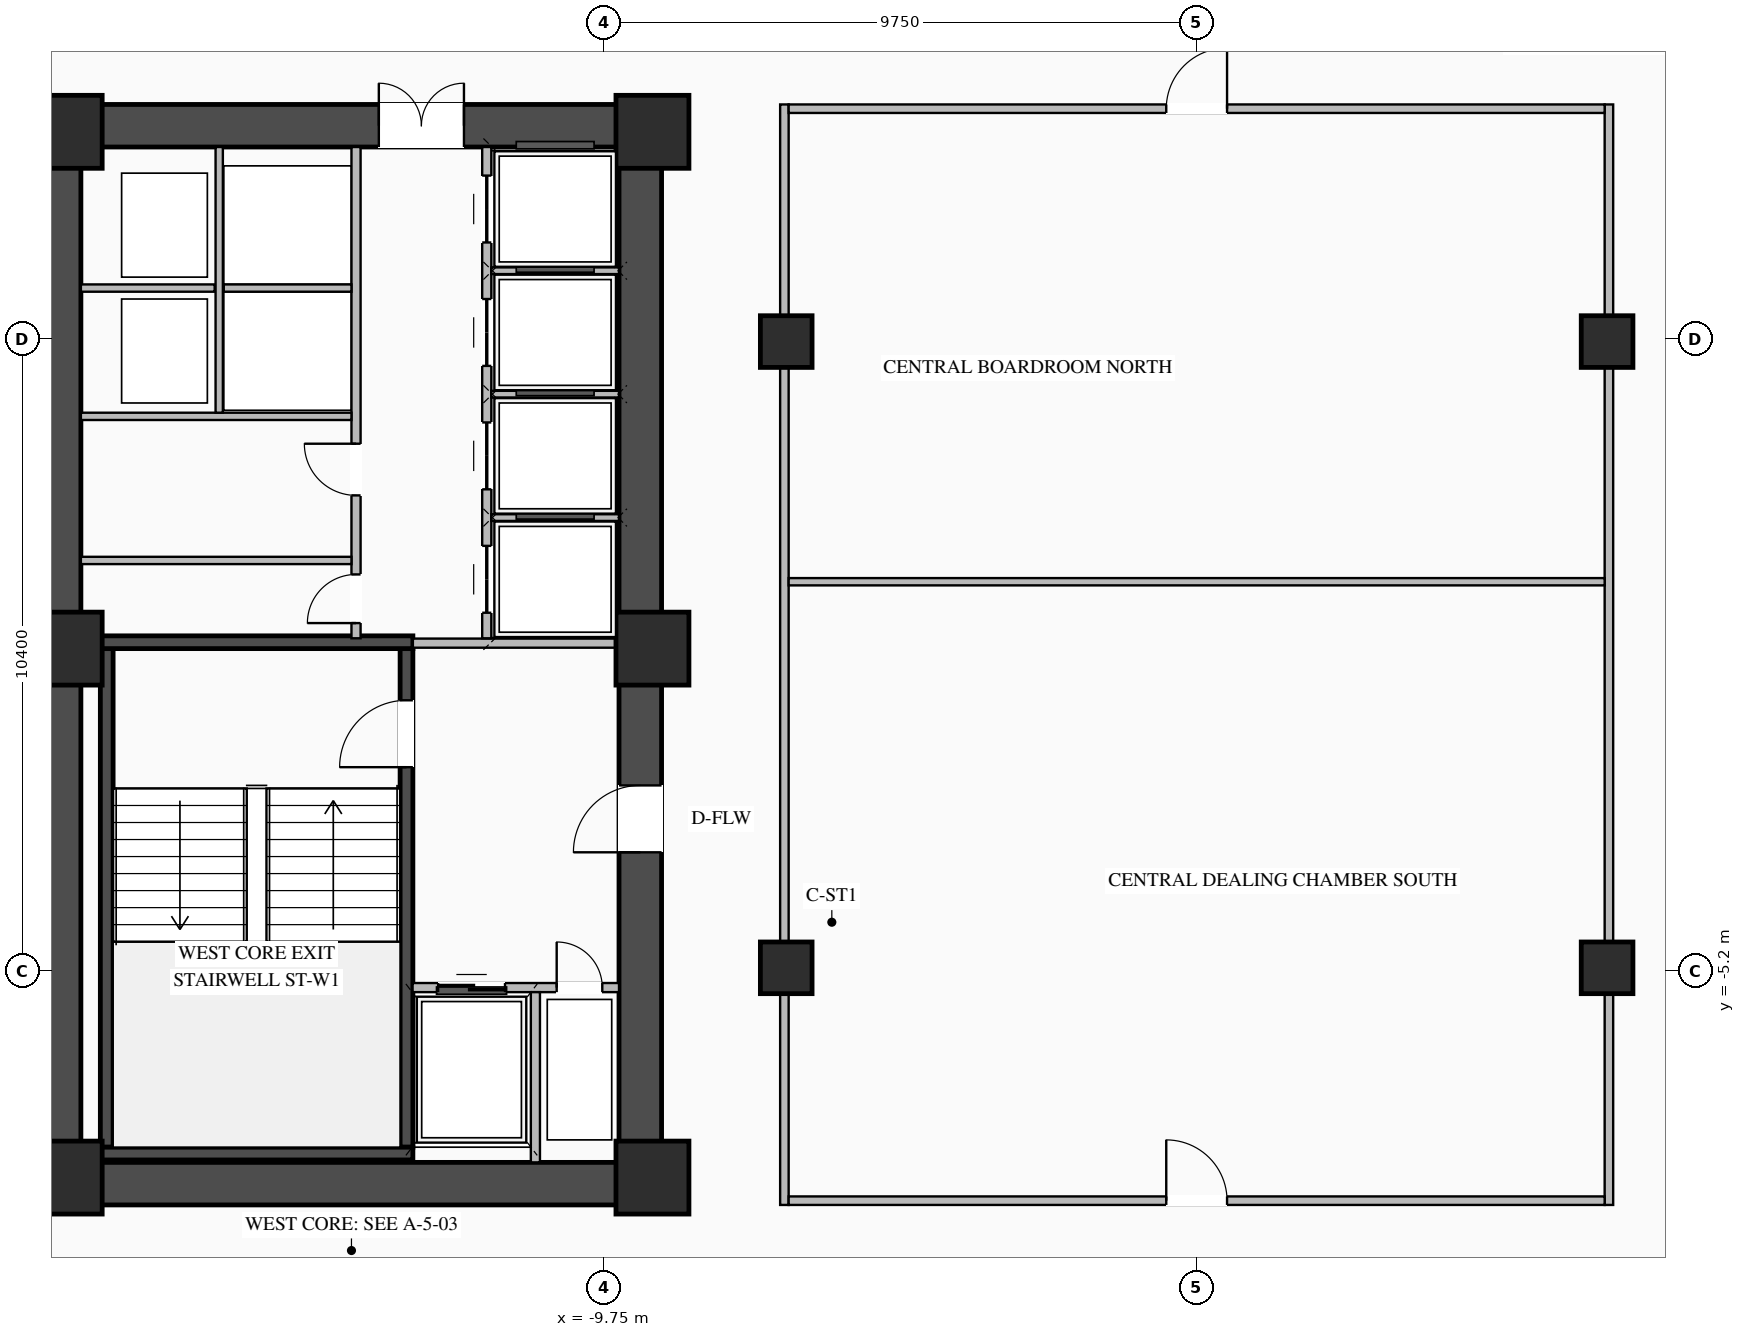
"""IFC4 building model, lengths in metres.
Left out: names, types, materials, properties, quantities, classifications, styles, units other than length and angle.
Written with IfcOpenShell. Run it as: python <this file> out.ifc"""

import sys

from ifc_helpers import new_model, si_unit, direction, frame, frame_2d, origin, origin_2d, place, context, subcontext, project, spatial, rectangle, i_section, extrude, element, fill, save


model = new_model("IFC4")
c1 = context("Model", 3, precision=1e-05, world=origin(), true_north=direction((0.0, 1.0)))
c2 = subcontext(c1, "Body", "Model", "MODEL_VIEW")
j1 = project(units=[si_unit("LENGTHUNIT", "METRE"), si_unit("PLANEANGLEUNIT", "RADIAN")], contexts=[c1])
p1 = place(None, origin())
s1 = spatial("IfcSite", under=j1, at=p1, CompositionType="ELEMENT")
p2 = place(p1, origin())
s2 = spatial("IfcBuilding", under=s1, at=p2, CompositionType="ELEMENT")
p3 = place(p2, frame((0.0, 0.0, 31.2)))
s3 = spatial("IfcBuildingStorey", under=s2, at=p3, CompositionType="ELEMENT", Elevation=31.2)
p4 = place(p3, frame((-19.05, -8.7, 0.0), z_axis=(0.0, 0.0, 1.0), x_axis=(1.0, 0.0, 0.0)))
e1 = element("IfcWall", 1, at=p4, inside=s3, PredefinedType="SHEAR", context=c2, shape_type="SweptSolid", body=[
    extrude(rectangle(XDim=10.25, YDim=0.7, at=frame_2d((5.125, 0.0))), origin(), (0.0, 0.0, 1.0), 3.27),
])
p5 = place(p3, frame((-19.05, 8.7, 0.0), z_axis=(0.0, 0.0, 1.0), x_axis=(1.0, 0.0, 0.0)))
e2 = element("IfcWall", 2, at=p5, inside=s3, PredefinedType="SHEAR", context=c2, shape_type="SweptSolid", body=[
    extrude(rectangle(XDim=10.25, YDim=0.7, at=frame_2d((5.125, 0.0))), origin(), (0.0, 0.0, 1.0), 3.27),
])
p6 = place(p5, frame((5.6, 0.0, 0.0)))
e3 = element("IfcOpeningElement", 3, at=p6, cuts=e2, PredefinedType="OPENING", context=c2, shape_type="SweptSolid", body=[
    extrude(rectangle(XDim=1.4, YDim=2.05, at=frame_2d((0.7, 1.025))), frame((0.0, 0.36, 0.0), z_axis=(0.0, -1.0, 0.0), x_axis=(1.0, 0.0, 0.0)), (0.0, 0.0, 1.0), 0.72),
])
p7 = place(p3, frame((-18.7, -8.35, 0.0), z_axis=(0.0, 0.0, 1.0), x_axis=(0.0, 1.0, 0.0)))
e4 = element("IfcWall", 4, at=p7, inside=s3, PredefinedType="SHEAR", context=c2, shape_type="SweptSolid", body=[
    extrude(rectangle(XDim=16.7, YDim=0.7, at=frame_2d((8.35, 0.0))), origin(), (0.0, 0.0, 1.0), 3.27),
])
p8 = place(p3, frame((-9.15, -8.35, 0.0), z_axis=(0.0, 0.0, 1.0), x_axis=(0.0, 1.0, 0.0)))
e5 = element("IfcWall", 5, at=p8, inside=s3, PredefinedType="SHEAR", context=c2, shape_type="SweptSolid", body=[
    extrude(rectangle(XDim=16.7, YDim=0.7, at=frame_2d((8.35, 0.0))), origin(), (0.0, 0.0, 1.0), 3.27),
])
p9 = place(p8, frame((5.1, 0.0, 0.0)))
e6 = element("IfcOpeningElement", 6, at=p9, cuts=e5, PredefinedType="OPENING", context=c2, shape_type="SweptSolid", body=[
    extrude(rectangle(XDim=1.1, YDim=2.08, at=frame_2d((0.55, 1.04))), frame((0.0, 0.36, 0.0), z_axis=(0.0, -1.0, 0.0), x_axis=(1.0, 0.0, 0.0)), (0.0, 0.0, 1.0), 0.72),
])
p10 = place(p3, frame((-12.995, -8.1, 0.0), z_axis=(0.0, 0.0, 1.0), x_axis=(0.0, 1.0, 0.0)))
e7 = element("IfcWall", 7, at=p10, inside=s3, PredefinedType="SHEAR", context=c2, shape_type="SweptSolid", body=[
    extrude(rectangle(XDim=8.2, YDim=0.21, at=frame_2d((4.1, 0.0))), origin(), (0.0, 0.0, 1.0), 3.27),
])
p11 = place(p10, frame((6.25, 0.0, 0.0)))
e8 = element("IfcOpeningElement", 8, at=p11, cuts=e7, PredefinedType="OPENING", context=c2, shape_type="SweptSolid", body=[
    extrude(rectangle(XDim=1.1, YDim=2.15, at=frame_2d((0.55, 1.075))), frame((0.0, 0.115, 0.0), z_axis=(0.0, -1.0, 0.0), x_axis=(1.0, 0.0, 0.0)), (0.0, 0.0, 1.0), 0.23),
])
p12 = place(p3, frame((-17.925, -8.1, 0.0), z_axis=(0.0, 0.0, 1.0), x_axis=(0.0, 1.0, 0.0)))
e9 = element("IfcWall", 9, at=p12, inside=s3, PredefinedType="SHEAR", context=c2, shape_type="SweptSolid", body=[
    extrude(rectangle(XDim=8.2, YDim=0.21, at=frame_2d((4.1, 0.0))), origin(), (0.0, 0.0, 1.0), 3.27),
])
for number, where, z_axis, x_axis in (
    (10, (-18.03, -8.205, 0.0), (0.0, 0.0, 1.0), (1.0, 0.0, 0.0)),
    (11, (-12.89, 0.205, 0.0), (0.0, 0.0, 1.0), (-1.0, 0.0, 0.0)),
):
    element("IfcWall", number, at=place(p3, frame(where, z_axis=z_axis, x_axis=x_axis)), inside=s3, PredefinedType="SHEAR", context=c2, shape_type="SweptSolid", body=[
        extrude(rectangle(XDim=5.14, YDim=0.21, at=frame_2d((2.57, 0.0))), origin(), (0.0, 0.0, 1.0), 3.27),
    ])
for number, where, z_axis, x_axis in (
    (12, (-8.95, -8.6, 0.0), (0.0, 0.0, 1.0), (1.0, 0.0, 0.0)),
    (13, (-8.95, 0.1, 0.0), (0.0, 0.0, 1.0), (1.0, 0.0, 0.0)),
    (14, (-8.95, 8.6, 0.0), (0.0, 0.0, 1.0), (1.0, 0.0, 0.0)),
    (15, (-18.6, -8.6, 0.0), (0.0, 0.0, 1.0), (1.0, 0.0, 0.0)),
    (16, (-18.6, 0.1, 0.0), (0.0, 0.0, 1.0), (1.0, 0.0, 0.0)),
    (17, (-18.6, 8.6, 0.0), (0.0, 0.0, 1.0), (1.0, 0.0, 0.0)),
):
    element("IfcColumn", number, at=place(p3, frame(where, z_axis=z_axis, x_axis=x_axis)), inside=s3, PredefinedType="COLUMN", context=c2, shape_type="SweptSolid", body=[
        extrude(rectangle(XDim=1.2, YDim=1.2, at=origin_2d()), origin(), (0.0, 0.0, 1.0), 3.45),
    ])
for number, where, z_axis, x_axis in (
    (18, (-6.75, -5.15, 0.0), (0.0, 0.0, 1.0), (1.0, 0.0, 0.0)),
    (19, (-6.75, 5.15, 0.0), (0.0, 0.0, 1.0), (1.0, 0.0, 0.0)),
    (20, (6.75, -5.15, 0.0), (0.0, 0.0, 1.0), (1.0, 0.0, 0.0)),
    (21, (6.75, 5.15, 0.0), (0.0, 0.0, 1.0), (1.0, 0.0, 0.0)),
):
    element("IfcColumn", number, at=place(p3, frame(where, z_axis=z_axis, x_axis=x_axis)), inside=s3, PredefinedType="COLUMN", context=c2, shape_type="SweptSolid", body=[
        extrude(i_section(OverallWidth=0.85, OverallDepth=0.85, WebThickness=0.032, FlangeThickness=0.048, at=origin_2d()), origin(), (0.0, 0.0, 1.0), 3.45),
    ])
p13 = place(p3, frame((-12.895, -5.475, 0.0), z_axis=(0.0, 0.0, 1.0), x_axis=(1.0, 0.0, 0.0)))
e22 = element("IfcWall", 22, at=p13, inside=s3, PredefinedType="STANDARD", context=c2, shape_type="SweptSolid", body=[
    extrude(rectangle(XDim=3.395, YDim=0.15, at=frame_2d((1.698, 0.0))), origin(), (0.0, 0.0, 1.0), 3.25),
])
p14 = place(p13, frame((0.42, 0.0, 0.0)))
e23 = element("IfcOpeningElement", 23, at=p14, cuts=e22, PredefinedType="OPENING", context=c2, shape_type="SweptSolid", body=[
    extrude(rectangle(XDim=1.1, YDim=2.15, at=frame_2d((0.55, 1.075))), frame((0.0, 0.085, 0.0), z_axis=(0.0, -1.0, 0.0), x_axis=(1.0, 0.0, 0.0)), (0.0, 0.0, 1.0), 0.17),
])
p15 = place(p13, frame((2.37, 0.0, 0.0)))
e24 = element("IfcOpeningElement", 24, at=p15, cuts=e22, PredefinedType="OPENING", context=c2, shape_type="SweptSolid", body=[
    extrude(rectangle(XDim=0.75, YDim=2.05, at=frame_2d((0.375, 1.025))), frame((0.0, 0.085, 0.0), z_axis=(0.0, -1.0, 0.0), x_axis=(1.0, 0.0, 0.0)), (0.0, 0.0, 1.0), 0.17),
])
p16 = place(p3, frame((-10.875, -8.35, 0.0), z_axis=(0.0, 0.0, 1.0), x_axis=(0.0, 1.0, 0.0)))
e25 = element("IfcWall", 25, at=p16, inside=s3, PredefinedType="STANDARD", context=c2, shape_type="SweptSolid", body=[
    extrude(rectangle(XDim=2.8, YDim=0.15, at=frame_2d((1.4, 0.0))), origin(), (0.0, 0.0, 1.0), 3.25),
])
p17 = place(p3, frame((-12.89, 0.19, 0.0), z_axis=(0.0, 0.0, 1.0), x_axis=(1.0, 0.0, 0.0)))
e26 = element("IfcWall", 26, at=p17, inside=s3, PredefinedType="STANDARD", context=c2, shape_type="SweptSolid", body=[
    extrude(rectangle(XDim=3.39, YDim=0.15, at=frame_2d((1.695, 0.0))), origin(), (0.0, 0.0, 1.0), 2.645),
])
p18 = place(p3, frame((-11.675, 0.27, 0.0), z_axis=(0.0, 0.0, 1.0), x_axis=(0.0, 1.0, 0.0)))
e27 = element("IfcWall", 27, at=p18, inside=s3, PredefinedType="STANDARD", context=c2, shape_type="SweptSolid", body=[
    extrude(rectangle(XDim=8.08, YDim=0.15, at=frame_2d((4.04, 0.0))), origin(), (0.0, 0.0, 1.0), 3.25),
])
p19 = place(p18, frame((0.42, 0.0, 0.0)))
e28 = element("IfcOpeningElement", 28, at=p19, cuts=e27, PredefinedType="OPENING", context=c2, shape_type="SweptSolid", body=[
    extrude(rectangle(XDim=1.1, YDim=2.1, at=frame_2d((0.55, 1.05))), frame((0.0, 0.085, 0.0), z_axis=(0.0, -1.0, 0.0), x_axis=(1.0, 0.0, 0.0)), (0.0, 0.0, 1.0), 0.17),
])
p20 = place(p18, frame((2.45, 0.0, 0.0)))
e29 = element("IfcOpeningElement", 29, at=p20, cuts=e27, PredefinedType="OPENING", context=c2, shape_type="SweptSolid", body=[
    extrude(rectangle(XDim=1.1, YDim=2.1, at=frame_2d((0.55, 1.05))), frame((0.0, 0.085, 0.0), z_axis=(0.0, -1.0, 0.0), x_axis=(1.0, 0.0, 0.0)), (0.0, 0.0, 1.0), 0.17),
])
p21 = place(p18, frame((4.48, 0.0, 0.0)))
e30 = element("IfcOpeningElement", 30, at=p21, cuts=e27, PredefinedType="OPENING", context=c2, shape_type="SweptSolid", body=[
    extrude(rectangle(XDim=1.1, YDim=2.1, at=frame_2d((0.55, 1.05))), frame((0.0, 0.085, 0.0), z_axis=(0.0, -1.0, 0.0), x_axis=(1.0, 0.0, 0.0)), (0.0, 0.0, 1.0), 0.17),
])
p22 = place(p18, frame((6.51, 0.0, 0.0)))
e31 = element("IfcOpeningElement", 31, at=p22, cuts=e27, PredefinedType="OPENING", context=c2, shape_type="SweptSolid", body=[
    extrude(rectangle(XDim=1.1, YDim=2.1, at=frame_2d((0.55, 1.05))), frame((0.0, 0.085, 0.0), z_axis=(0.0, -1.0, 0.0), x_axis=(1.0, 0.0, 0.0)), (0.0, 0.0, 1.0), 0.17),
])
for number, where, z_axis, x_axis in (
    (32, (-11.6, 2.255, 0.0), (0.0, 0.0, 1.0), (1.0, 0.0, 0.0)),
    (33, (-11.6, 4.285, 0.0), (0.0, 0.0, 1.0), (1.0, 0.0, 0.0)),
    (34, (-11.6, 6.315, 0.0), (0.0, 0.0, 1.0), (1.0, 0.0, 0.0)),
):
    element("IfcWall", number, at=place(p3, frame(where, z_axis=z_axis, x_axis=x_axis)), inside=s3, PredefinedType="STANDARD", context=c2, shape_type="SweptSolid", body=[
        extrude(rectangle(XDim=2.1, YDim=0.11, at=frame_2d((1.05, 0.0))), origin(), (0.0, 0.0, 1.0), 3.25),
    ])
p23 = place(p3, frame((-13.825, 0.27, 0.0), z_axis=(0.0, 0.0, 1.0), x_axis=(0.0, 1.0, 0.0)))
e35 = element("IfcWall", 35, at=p23, inside=s3, PredefinedType="STANDARD", context=c2, shape_type="SweptSolid", body=[
    extrude(rectangle(XDim=8.08, YDim=0.15, at=frame_2d((4.04, 0.0))), origin(), (0.0, 0.0, 1.0), 3.25),
])
p24 = place(p23, frame((0.25, 0.0, 0.0)))
e36 = element("IfcOpeningElement", 36, at=p24, cuts=e35, PredefinedType="OPENING", context=c2, shape_type="SweptSolid", body=[
    extrude(rectangle(XDim=0.8, YDim=2.05, at=frame_2d((0.4, 1.025))), frame((0.0, 0.085, 0.0), z_axis=(0.0, -1.0, 0.0), x_axis=(1.0, 0.0, 0.0)), (0.0, 0.0, 1.0), 0.17),
])
p25 = place(p23, frame((2.35, 0.0, 0.0)))
e37 = element("IfcOpeningElement", 37, at=p25, cuts=e35, PredefinedType="OPENING", context=c2, shape_type="SweptSolid", body=[
    extrude(rectangle(XDim=0.85, YDim=2.05, at=frame_2d((0.425, 1.025))), frame((0.0, 0.085, 0.0), z_axis=(0.0, -1.0, 0.0), x_axis=(1.0, 0.0, 0.0)), (0.0, 0.0, 1.0), 0.17),
])
p26 = place(p3, frame((-18.35, 3.92, 0.0), z_axis=(0.0, 0.0, 1.0), x_axis=(1.0, 0.0, 0.0)))
e38 = element("IfcWall", 38, at=p26, inside=s3, PredefinedType="STANDARD", context=c2, shape_type="SweptSolid", body=[
    extrude(rectangle(XDim=4.45, YDim=0.12, at=frame_2d((2.225, 0.0))), origin(), (0.0, 0.0, 1.0), 3.25),
])
p27 = place(p3, frame((-18.35, 6.03, 0.0), z_axis=(0.0, 0.0, 1.0), x_axis=(1.0, 0.0, 0.0)))
e39 = element("IfcWall", 39, at=p27, inside=s3, PredefinedType="STANDARD", context=c2, shape_type="SweptSolid", body=[
    extrude(rectangle(XDim=2.2, YDim=0.12, at=frame_2d((1.1, 0.0))), origin(), (0.0, 0.0, 1.0), 3.25),
])
p28 = place(p3, frame((-16.075, 3.98, 0.0), z_axis=(0.0, 0.0, 1.0), x_axis=(0.0, 1.0, 0.0)))
e40 = element("IfcWall", 40, at=p28, inside=s3, PredefinedType="STANDARD", context=c2, shape_type="SweptSolid", body=[
    extrude(rectangle(XDim=4.37, YDim=0.12, at=frame_2d((2.185, 0.0))), origin(), (0.0, 0.0, 1.0), 3.25),
])
p29 = place(p3, frame((-16.0, 6.03, 0.0), z_axis=(0.0, 0.0, 1.0), x_axis=(1.0, 0.0, 0.0)))
e41 = element("IfcWall", 41, at=p29, inside=s3, PredefinedType="STANDARD", context=c2, shape_type="SweptSolid", body=[
    extrude(rectangle(XDim=2.1, YDim=0.12, at=frame_2d((1.05, 0.0))), origin(), (0.0, 0.0, 1.0), 3.25),
])
p30 = place(p3, frame((-18.35, 1.55, 0.0), z_axis=(0.0, 0.0, 1.0), x_axis=(1.0, 0.0, 0.0)))
e42 = element("IfcWall", 42, at=p30, inside=s3, PredefinedType="STANDARD", context=c2, shape_type="SweptSolid", body=[
    extrude(rectangle(XDim=4.45, YDim=0.12, at=frame_2d((2.225, 0.0))), origin(), (0.0, 0.0, 1.0), 3.25),
])
for number, where, z_axis, x_axis in (
    (43, (-6.78, -9.05, 0.0), (0.0, 0.0, 1.0), (0.0, 1.0, 0.0)),
    (44, (6.78, -9.05, 0.0), (0.0, 0.0, 1.0), (0.0, 1.0, 0.0)),
):
    element("IfcWall", number, at=place(p3, frame(where, z_axis=z_axis, x_axis=x_axis)), inside=s3, PredefinedType="STANDARD", context=c2, shape_type="SweptSolid", body=[
        extrude(rectangle(XDim=18.1, YDim=0.14, at=frame_2d((9.05, 0.0))), origin(), (0.0, 0.0, 1.0), 2.645),
    ])
p31 = place(p3, frame((-6.71, -8.98, 0.0), z_axis=(0.0, 0.0, 1.0), x_axis=(1.0, 0.0, 0.0)))
e45 = element("IfcWall", 45, at=p31, inside=s3, PredefinedType="STANDARD", context=c2, shape_type="SweptSolid", body=[
    extrude(rectangle(XDim=13.42, YDim=0.14, at=frame_2d((6.71, 0.0))), origin(), (0.0, 0.0, 1.0), 3.25),
])
p32 = place(p31, frame((6.21, 0.0, 0.0)))
e46 = element("IfcOpeningElement", 46, at=p32, cuts=e45, PredefinedType="OPENING", context=c2, shape_type="SweptSolid", body=[
    extrude(rectangle(XDim=1.0, YDim=2.08, at=frame_2d((0.5, 1.04))), frame((0.0, 0.08, 0.0), z_axis=(0.0, -1.0, 0.0), x_axis=(1.0, 0.0, 0.0)), (0.0, 0.0, 1.0), 0.16),
])
p33 = place(p3, frame((-6.71, 8.98, 0.0), z_axis=(0.0, 0.0, 1.0), x_axis=(1.0, 0.0, 0.0)))
e47 = element("IfcWall", 47, at=p33, inside=s3, PredefinedType="STANDARD", context=c2, shape_type="SweptSolid", body=[
    extrude(rectangle(XDim=13.42, YDim=0.14, at=frame_2d((6.71, 0.0))), origin(), (0.0, 0.0, 1.0), 3.25),
])
p34 = place(p33, frame((6.21, 0.0, 0.0)))
e48 = element("IfcOpeningElement", 48, at=p34, cuts=e47, PredefinedType="OPENING", context=c2, shape_type="SweptSolid", body=[
    extrude(rectangle(XDim=1.0, YDim=2.08, at=frame_2d((0.5, 1.04))), frame((0.0, 0.08, 0.0), z_axis=(0.0, -1.0, 0.0), x_axis=(1.0, 0.0, 0.0)), (0.0, 0.0, 1.0), 0.16),
])
p35 = place(p3, frame((-6.71, 1.2, 0.0), z_axis=(0.0, 0.0, 1.0), x_axis=(1.0, 0.0, 0.0)))
e49 = element("IfcWall", 49, at=p35, inside=s3, PredefinedType="STANDARD", context=c2, shape_type="SweptSolid", body=[
    extrude(rectangle(XDim=13.42, YDim=0.12, at=frame_2d((6.71, 0.0))), origin(), (0.0, 0.0, 1.0), 3.25),
])
p36 = place(p11, origin())
e50 = element("IfcDoor", 50, at=p36, inside=s3, OperationType="SINGLE_SWING_LEFT", PredefinedType="DOOR", context=c2, shape_type="SweptSolid", body=[
    extrude(rectangle(XDim=1.1, YDim=2.15, at=frame_2d((0.55, 1.075))), frame((0.0, 0.025, 0.0), z_axis=(0.0, -1.0, 0.0), x_axis=(1.0, 0.0, 0.0)), (0.0, 0.0, 1.0), 0.05),
])
fill(e8, e50)
p37 = place(p14, origin())
e51 = element("IfcDoor", 51, at=p37, inside=s3, OperationType="DOUBLE_DOOR_SLIDING", PredefinedType="DOOR", context=c2, shape_type="SweptSolid", body=[
    extrude(rectangle(XDim=1.1, YDim=2.15, at=frame_2d((0.55, 1.075))), frame((0.0, 0.025, 0.0), z_axis=(0.0, -1.0, 0.0), x_axis=(1.0, 0.0, 0.0)), (0.0, 0.0, 1.0), 0.05),
])
fill(e23, e51)
p38 = place(p15, origin())
e52 = element("IfcDoor", 52, at=p38, inside=s3, OperationType="SINGLE_SWING_LEFT", PredefinedType="DOOR", context=c2, shape_type="SweptSolid", body=[
    extrude(rectangle(XDim=0.75, YDim=2.05, at=frame_2d((0.375, 1.025))), frame((0.0, 0.025, 0.0), z_axis=(0.0, -1.0, 0.0), x_axis=(1.0, 0.0, 0.0)), (0.0, 0.0, 1.0), 0.05),
])
fill(e24, e52)
p39 = place(p9, origin())
e53 = element("IfcDoor", 53, at=p39, inside=s3, OperationType="SINGLE_SWING_LEFT", PredefinedType="DOOR", context=c2, shape_type="SweptSolid", body=[
    extrude(rectangle(XDim=1.1, YDim=2.08, at=frame_2d((0.55, 1.04))), frame((0.0, 0.305, 0.0), z_axis=(0.0, -1.0, 0.0), x_axis=(1.0, 0.0, 0.0)), (0.0, 0.0, 1.0), 0.05),
])
fill(e6, e53)
p40 = place(p6, origin())
e54 = element("IfcDoor", 54, at=p40, inside=s3, OperationType="DOUBLE_DOOR_SINGLE_SWING", PredefinedType="DOOR", context=c2, shape_type="SweptSolid", body=[
    extrude(rectangle(XDim=1.4, YDim=2.05, at=frame_2d((0.7, 1.025))), frame((0.0, 0.295, 0.0), z_axis=(0.0, -1.0, 0.0), x_axis=(1.0, 0.0, 0.0)), (0.0, 0.0, 1.0), 0.05),
])
fill(e3, e54)
p41 = place(p19, origin())
e55 = element("IfcDoor", 55, at=p41, inside=s3, OperationType="DOUBLE_DOOR_SLIDING", PredefinedType="DOOR", context=c2, shape_type="SweptSolid", body=[
    extrude(rectangle(XDim=1.1, YDim=2.1, at=frame_2d((0.55, 1.05))), frame((0.0, 0.025, 0.0), z_axis=(0.0, -1.0, 0.0), x_axis=(1.0, 0.0, 0.0)), (0.0, 0.0, 1.0), 0.05),
])
fill(e28, e55)
p42 = place(p20, origin())
e56 = element("IfcDoor", 56, at=p42, inside=s3, OperationType="DOUBLE_DOOR_SLIDING", PredefinedType="DOOR", context=c2, shape_type="SweptSolid", body=[
    extrude(rectangle(XDim=1.1, YDim=2.1, at=frame_2d((0.55, 1.05))), frame((0.0, 0.025, 0.0), z_axis=(0.0, -1.0, 0.0), x_axis=(1.0, 0.0, 0.0)), (0.0, 0.0, 1.0), 0.05),
])
fill(e29, e56)
p43 = place(p21, origin())
e57 = element("IfcDoor", 57, at=p43, inside=s3, OperationType="DOUBLE_DOOR_SLIDING", PredefinedType="DOOR", context=c2, shape_type="SweptSolid", body=[
    extrude(rectangle(XDim=1.1, YDim=2.1, at=frame_2d((0.55, 1.05))), frame((0.0, 0.025, 0.0), z_axis=(0.0, -1.0, 0.0), x_axis=(1.0, 0.0, 0.0)), (0.0, 0.0, 1.0), 0.05),
])
fill(e30, e57)
p44 = place(p22, origin())
e58 = element("IfcDoor", 58, at=p44, inside=s3, OperationType="DOUBLE_DOOR_SLIDING", PredefinedType="DOOR", context=c2, shape_type="SweptSolid", body=[
    extrude(rectangle(XDim=1.1, YDim=2.1, at=frame_2d((0.55, 1.05))), frame((0.0, 0.025, 0.0), z_axis=(0.0, -1.0, 0.0), x_axis=(1.0, 0.0, 0.0)), (0.0, 0.0, 1.0), 0.05),
])
fill(e31, e58)
p45 = place(p24, origin())
e59 = element("IfcDoor", 59, at=p45, inside=s3, OperationType="SINGLE_SWING_LEFT", PredefinedType="DOOR", context=c2, shape_type="SweptSolid", body=[
    extrude(rectangle(XDim=0.8, YDim=2.05, at=frame_2d((0.4, 1.025))), frame((0.0, 0.025, 0.0), z_axis=(0.0, -1.0, 0.0), x_axis=(1.0, 0.0, 0.0)), (0.0, 0.0, 1.0), 0.05),
])
fill(e36, e59)
p46 = place(p25, origin())
e60 = element("IfcDoor", 60, at=p46, inside=s3, OperationType="SINGLE_SWING_RIGHT", PredefinedType="DOOR", context=c2, shape_type="SweptSolid", body=[
    extrude(rectangle(XDim=0.85, YDim=2.05, at=frame_2d((0.425, 1.025))), frame((0.0, 0.025, 0.0), z_axis=(0.0, -1.0, 0.0), x_axis=(1.0, 0.0, 0.0)), (0.0, 0.0, 1.0), 0.05),
])
fill(e37, e60)
p47 = place(p32, origin())
e61 = element("IfcDoor", 61, at=p47, inside=s3, OperationType="SINGLE_SWING_LEFT", PredefinedType="DOOR", context=c2, shape_type="SweptSolid", body=[
    extrude(rectangle(XDim=1.0, YDim=2.08, at=frame_2d((0.5, 1.04))), frame((0.0, 0.025, 0.0), z_axis=(0.0, -1.0, 0.0), x_axis=(1.0, 0.0, 0.0)), (0.0, 0.0, 1.0), 0.05),
])
fill(e46, e61)
p48 = place(p34, origin())
e62 = element("IfcDoor", 62, at=p48, inside=s3, OperationType="SINGLE_SWING_RIGHT", PredefinedType="DOOR", context=c2, shape_type="SweptSolid", body=[
    extrude(rectangle(XDim=1.0, YDim=2.08, at=frame_2d((0.5, 1.04))), frame((0.0, 0.025, 0.0), z_axis=(0.0, -1.0, 0.0), x_axis=(1.0, 0.0, 0.0)), (0.0, 0.0, 1.0), 0.05),
])
fill(e48, e62)
save(model, sys.argv[1])
